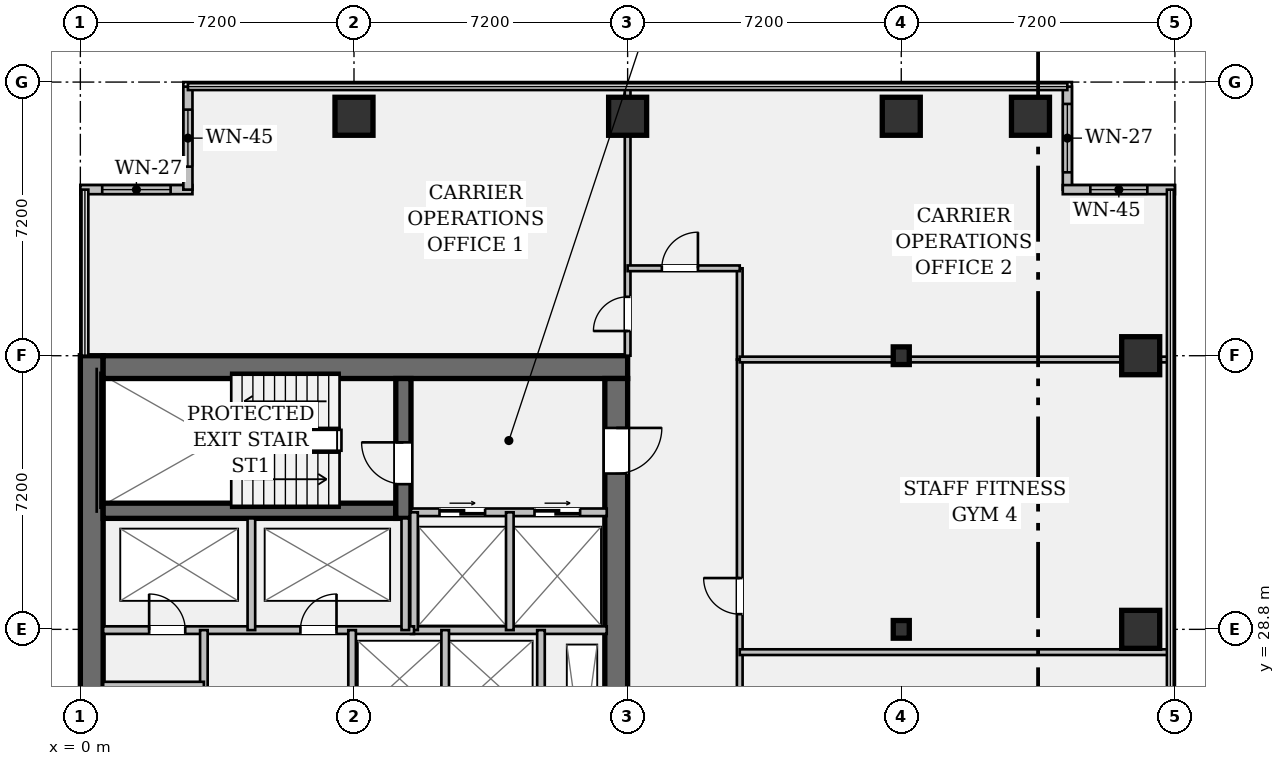
"""IFC4 building model, lengths in metres.
Left out: names, types, materials, properties, quantities, classifications, styles, units other than length and angle.
Written with IfcOpenShell. Run it as: python <this file> out.ifc"""

import sys

from ifc_helpers import new_model, si_unit, direction, frame, frame_2d, origin, origin_2d, place, context, subcontext, project, spatial, rectangle, hollow_rectangle, i_section, extrude, element, fill, save


model = new_model("IFC4")
c1 = context("Model", 3, precision=1e-05, world=origin(), true_north=direction((0.0, 1.0)))
c2 = subcontext(c1, "Body", "Model", "MODEL_VIEW")
j1 = project(units=[si_unit("LENGTHUNIT", "METRE"), si_unit("PLANEANGLEUNIT", "RADIAN")], contexts=[c1])
p1 = place(None, origin())
s1 = spatial("IfcSite", under=j1, at=p1, CompositionType="ELEMENT")
p2 = place(p1, origin())
s2 = spatial("IfcBuilding", under=s1, at=p2, CompositionType="ELEMENT")
p3 = place(p2, frame((0.0, 0.0, 65.8)))
s3 = spatial("IfcBuildingStorey", under=s2, at=p3, CompositionType="ELEMENT", Elevation=65.8)
p4 = place(p3, frame((0.3, 7.2, 0.0), z_axis=(0.0, 0.0, 1.0), x_axis=(0.0, 1.0, 0.0)))
e1 = element("IfcWall", 1, at=p4, inside=s3, PredefinedType="SHEAR", context=c2, shape_type="SweptSolid", body=[
    extrude(rectangle(XDim=28.8, YDim=0.6, at=frame_2d((14.4, 0.0))), origin(), (0.0, 0.0, 1.0), 3.57),
])
p5 = place(p3, frame((0.6, 35.7, 0.0), z_axis=(0.0, 0.0, 1.0), x_axis=(1.0, 0.0, 0.0)))
e2 = element("IfcWall", 2, at=p5, inside=s3, PredefinedType="SHEAR", context=c2, shape_type="SweptSolid", body=[
    extrude(rectangle(XDim=13.8, YDim=0.6, at=frame_2d((6.9, 0.0))), origin(), (0.0, 0.0, 1.0), 3.57),
])
p6 = place(p3, frame((14.1, 35.4, 0.0), z_axis=(0.0, 0.0, 1.0), x_axis=(0.0, -1.0, 0.0)))
e3 = element("IfcWall", 3, at=p6, inside=s3, PredefinedType="SHEAR", context=c2, shape_type="SweptSolid", body=[
    extrude(rectangle(XDim=27.6, YDim=0.6, at=frame_2d((13.8, 0.0))), origin(), (0.0, 0.0, 1.0), 3.57),
])
p7 = place(p6, frame((1.3, 0.0, 0.0)))
e4 = element("IfcOpeningElement", 4, at=p7, cuts=e3, PredefinedType="OPENING", context=c2, shape_type="SweptSolid", body=[
    extrude(rectangle(XDim=1.2, YDim=2.15, at=frame_2d((0.6, 1.075))), frame((0.0, 0.312, 0.0), z_axis=(0.0, -1.0, 0.0), x_axis=(1.0, 0.0, 0.0)), (0.0, 0.0, 1.0), 0.624),
])
p8 = place(p6, frame((25.25, 0.0, 0.0)))
e5 = element("IfcOpeningElement", 5, at=p8, cuts=e3, PredefinedType="OPENING", context=c2, shape_type="SweptSolid", body=[
    extrude(rectangle(XDim=1.2, YDim=2.15, at=frame_2d((0.6, 1.075))), frame((0.0, 0.312, 0.0), z_axis=(0.0, -1.0, 0.0), x_axis=(1.0, 0.0, 0.0)), (0.0, 0.0, 1.0), 0.624),
])
p9 = place(p6, frame((14.6, 0.0, 0.0)))
e6 = element("IfcOpeningElement", 6, at=p9, cuts=e3, PredefinedType="OPENING", context=c2, shape_type="SweptSolid", body=[
    extrude(rectangle(XDim=1.6, YDim=2.2, at=frame_2d((0.8, 1.1))), frame((0.0, 0.312, 0.0), z_axis=(0.0, -1.0, 0.0), x_axis=(1.0, 0.0, 0.0)), (0.0, 0.0, 1.0), 0.624),
])
p10 = place(p3, frame((0.6, 31.92, 0.0), z_axis=(0.0, 0.0, 1.0), x_axis=(1.0, 0.0, 0.0)))
e7 = element("IfcWall", 7, at=p10, inside=s3, PredefinedType="SHEAR", context=c2, shape_type="SweptSolid", body=[
    extrude(rectangle(XDim=7.7, YDim=0.4, at=frame_2d((3.85, 0.0))), origin(), (0.0, 0.0, 1.0), 3.57),
])
p11 = place(p3, frame((8.5, 31.72, 0.0), z_axis=(0.0, 0.0, 1.0), x_axis=(0.0, 1.0, 0.0)))
e8 = element("IfcWall", 8, at=p11, inside=s3, PredefinedType="SHEAR", context=c2, shape_type="SweptSolid", body=[
    extrude(rectangle(XDim=3.68, YDim=0.4, at=frame_2d((1.84, 0.0))), origin(), (0.0, 0.0, 1.0), 3.57),
])
p12 = place(p11, frame((0.9, 0.0, 0.0)))
e9 = element("IfcOpeningElement", 9, at=p12, cuts=e8, PredefinedType="OPENING", context=c2, shape_type="SweptSolid", body=[
    extrude(rectangle(XDim=1.1, YDim=2.15, at=frame_2d((0.55, 1.075))), frame((0.0, 0.212, 0.0), z_axis=(0.0, -1.0, 0.0), x_axis=(1.0, 0.0, 0.0)), (0.0, 0.0, 1.0), 0.424),
])
for number, where, z_axis, x_axis in (
    (10, (7.2, 42.3, 0.0), (0.0, 0.0, 1.0), (1.0, 0.0, 0.0)),
    (11, (14.4, 42.3, 0.0), (0.0, 0.0, 1.0), (1.0, 0.0, 0.0)),
):
    element("IfcColumn", number, at=place(p3, frame(where, z_axis=z_axis, x_axis=x_axis)), inside=s3, PredefinedType="COLUMN", context=c2, shape_type="SweptSolid", body=[
        extrude(hollow_rectangle(XDim=1.0, YDim=1.0, WallThickness=0.065, at=origin_2d()), origin(), (0.0, 0.0, 1.0), 3.57),
    ])
for number, where, z_axis, x_axis in (
    (12, (21.6, 28.8, 0.0), (0.0, 0.0, 1.0), (1.0, 0.0, 0.0)),
    (13, (21.6, 36.0, 0.0), (0.0, 0.0, 1.0), (1.0, 0.0, 0.0)),
):
    element("IfcColumn", number, at=place(p3, frame(where, z_axis=z_axis, x_axis=x_axis)), inside=s3, PredefinedType="COLUMN", context=c2, shape_type="SweptSolid", body=[
        extrude(i_section(OverallWidth=0.422, OverallDepth=0.465, WebThickness=0.045, FlangeThickness=0.073, FilletRadius=0.018, at=origin_2d()), origin(), (0.0, 0.0, 1.0), 3.57),
    ])
for number, where, z_axis, x_axis in (
    (14, (21.6, 42.3, 0.0), (0.0, 0.0, 1.0), (1.0, 0.0, 0.0)),
    (15, (25.0, 42.3, 0.0), (0.0, 0.0, 1.0), (1.0, 0.0, 0.0)),
    (16, (27.9, 28.8, 0.0), (0.0, 0.0, 1.0), (1.0, 0.0, 0.0)),
    (17, (27.9, 36.0, 0.0), (0.0, 0.0, 1.0), (1.0, 0.0, 0.0)),
):
    element("IfcColumn", number, at=place(p3, frame(where, z_axis=z_axis, x_axis=x_axis)), inside=s3, PredefinedType="COLUMN", context=c2, shape_type="SweptSolid", body=[
        extrude(hollow_rectangle(XDim=1.0, YDim=1.0, WallThickness=0.065, at=origin_2d()), origin(), (0.0, 0.0, 1.0), 3.57),
    ])
p13 = place(p3, frame((0.0, 40.37, 0.0), z_axis=(0.0, 0.0, 1.0), x_axis=(1.0, 0.0, 0.0)))
e18 = element("IfcWall", 18, at=p13, inside=s3, PredefinedType="STANDARD", context=c2, shape_type="SweptSolid", body=[
    extrude(rectangle(XDim=2.95, YDim=0.24, at=frame_2d((1.475, 0.0))), origin(), (0.0, 0.0, 1.0), 3.57),
])
p14 = place(p13, frame((0.575, 0.0, 0.95)))
e19 = element("IfcOpeningElement", 19, at=p14, cuts=e18, PredefinedType="OPENING", context=c2, shape_type="SweptSolid", body=[
    extrude(rectangle(XDim=1.8, YDim=1.35, at=frame_2d((0.9, 0.675))), frame((0.0, 0.132, 0.0), z_axis=(0.0, -1.0, 0.0), x_axis=(1.0, 0.0, 0.0)), (0.0, 0.0, 1.0), 0.264),
])
p15 = place(p3, frame((2.83, 40.37, 0.0), z_axis=(0.0, 0.0, 1.0), x_axis=(0.0, 1.0, 0.0)))
e20 = element("IfcWall", 20, at=p15, inside=s3, PredefinedType="STANDARD", context=c2, shape_type="SweptSolid", body=[
    extrude(rectangle(XDim=2.71, YDim=0.24, at=frame_2d((1.355, 0.0))), origin(), (0.0, 0.0, 1.0), 3.57),
])
p16 = place(p15, frame((0.605, 0.0, 0.95)))
e21 = element("IfcOpeningElement", 21, at=p16, cuts=e20, PredefinedType="OPENING", context=c2, shape_type="SweptSolid", body=[
    extrude(rectangle(XDim=1.5, YDim=1.8, at=frame_2d((0.75, 0.9))), frame((0.0, 0.132, 0.0), z_axis=(0.0, -1.0, 0.0), x_axis=(1.0, 0.0, 0.0)), (0.0, 0.0, 1.0), 0.264),
])
p17 = place(p3, frame((25.97, 43.08, 0.0), z_axis=(0.0, 0.0, 1.0), x_axis=(0.0, -1.0, 0.0)))
e22 = element("IfcWall", 22, at=p17, inside=s3, PredefinedType="STANDARD", context=c2, shape_type="SweptSolid", body=[
    extrude(rectangle(XDim=2.71, YDim=0.24, at=frame_2d((1.355, 0.0))), origin(), (0.0, 0.0, 1.0), 3.57),
])
p18 = place(p17, frame((0.455, 0.0, 0.95)))
e23 = element("IfcOpeningElement", 23, at=p18, cuts=e22, PredefinedType="OPENING", context=c2, shape_type="SweptSolid", body=[
    extrude(rectangle(XDim=1.8, YDim=1.35, at=frame_2d((0.9, 0.675))), frame((0.0, 0.132, 0.0), z_axis=(0.0, -1.0, 0.0), x_axis=(1.0, 0.0, 0.0)), (0.0, 0.0, 1.0), 0.264),
])
p19 = place(p3, frame((25.85, 40.37, 0.0), z_axis=(0.0, 0.0, 1.0), x_axis=(1.0, 0.0, 0.0)))
e24 = element("IfcWall", 24, at=p19, inside=s3, PredefinedType="STANDARD", context=c2, shape_type="SweptSolid", body=[
    extrude(rectangle(XDim=2.95, YDim=0.24, at=frame_2d((1.475, 0.0))), origin(), (0.0, 0.0, 1.0), 3.57),
])
p20 = place(p19, frame((0.725, 0.0, 0.95)))
e25 = element("IfcOpeningElement", 25, at=p20, cuts=e24, PredefinedType="OPENING", context=c2, shape_type="SweptSolid", body=[
    extrude(rectangle(XDim=1.5, YDim=1.8, at=frame_2d((0.75, 0.9))), frame((0.0, 0.132, 0.0), z_axis=(0.0, -1.0, 0.0), x_axis=(1.0, 0.0, 0.0)), (0.0, 0.0, 1.0), 0.264),
])
p21 = place(p3, frame((8.7, 31.88, 0.0), z_axis=(0.0, 0.0, 1.0), x_axis=(1.0, 0.0, 0.0)))
e26 = element("IfcWall", 26, at=p21, inside=s3, PredefinedType="PARTITIONING", context=c2, shape_type="SweptSolid", body=[
    extrude(rectangle(XDim=5.15, YDim=0.2, at=frame_2d((2.575, 0.0))), origin(), (0.0, 0.0, 1.0), 3.57),
])
p22 = place(p21, frame((0.75, 0.0, 0.0)))
e27 = element("IfcOpeningElement", 27, at=p22, cuts=e26, PredefinedType="OPENING", context=c2, shape_type="SweptSolid", body=[
    extrude(rectangle(XDim=1.2, YDim=2.2, at=frame_2d((0.6, 1.1))), frame((0.0, 0.112, 0.0), z_axis=(0.0, -1.0, 0.0), x_axis=(1.0, 0.0, 0.0)), (0.0, 0.0, 1.0), 0.224),
])
p23 = place(p21, frame((3.25, 0.0, 0.0)))
e28 = element("IfcOpeningElement", 28, at=p23, cuts=e26, PredefinedType="OPENING", context=c2, shape_type="SweptSolid", body=[
    extrude(rectangle(XDim=1.2, YDim=2.2, at=frame_2d((0.6, 1.1))), frame((0.0, 0.112, 0.0), z_axis=(0.0, -1.0, 0.0), x_axis=(1.0, 0.0, 0.0)), (0.0, 0.0, 1.0), 0.224),
])
p24 = place(p3, frame((8.7, 28.78, 0.0), z_axis=(0.0, 0.0, 1.0), x_axis=(1.0, 0.0, 0.0)))
e29 = element("IfcWall", 29, at=p24, inside=s3, PredefinedType="PARTITIONING", context=c2, shape_type="SweptSolid", body=[
    extrude(rectangle(XDim=5.15, YDim=0.2, at=frame_2d((2.575, 0.0))), origin(), (0.0, 0.0, 1.0), 3.57),
])
for number, where, z_axis, x_axis in (
    (30, (8.78, 28.78, 0.0), (0.0, 0.0, 1.0), (0.0, 1.0, 0.0)),
    (31, (11.3, 28.78, 0.0), (0.0, 0.0, 1.0), (0.0, 1.0, 0.0)),
):
    element("IfcWall", number, at=place(p3, frame(where, z_axis=z_axis, x_axis=x_axis)), inside=s3, PredefinedType="PARTITIONING", context=c2, shape_type="SweptSolid", body=[
        extrude(rectangle(XDim=3.1, YDim=0.2, at=frame_2d((1.55, 0.0))), origin(), (0.0, 0.0, 1.0), 3.57),
    ])
p25 = place(p3, frame((0.6, 28.78, 0.0), z_axis=(0.0, 0.0, 1.0), x_axis=(1.0, 0.0, 0.0)))
e32 = element("IfcWall", 32, at=p25, inside=s3, PredefinedType="PARTITIONING", context=c2, shape_type="SweptSolid", body=[
    extrude(rectangle(XDim=8.18, YDim=0.2, at=frame_2d((4.09, 0.0))), origin(), (0.0, 0.0, 1.0), 3.57),
])
p26 = place(p25, frame((1.21, 0.0, 0.0)))
e33 = element("IfcOpeningElement", 33, at=p26, cuts=e32, PredefinedType="OPENING", context=c2, shape_type="SweptSolid", body=[
    extrude(rectangle(XDim=0.95, YDim=2.15, at=frame_2d((0.475, 1.075))), frame((0.0, 0.112, 0.0), z_axis=(0.0, -1.0, 0.0), x_axis=(1.0, 0.0, 0.0)), (0.0, 0.0, 1.0), 0.224),
])
p27 = place(p25, frame((5.19, 0.0, 0.0)))
e34 = element("IfcOpeningElement", 34, at=p27, cuts=e32, PredefinedType="OPENING", context=c2, shape_type="SweptSolid", body=[
    extrude(rectangle(XDim=0.95, YDim=2.15, at=frame_2d((0.475, 1.075))), frame((0.0, 0.112, 0.0), z_axis=(0.0, -1.0, 0.0), x_axis=(1.0, 0.0, 0.0)), (0.0, 0.0, 1.0), 0.224),
])
for number, where, z_axis, x_axis in (
    (35, (4.5, 28.78, 0.0), (0.0, 0.0, 1.0), (0.0, 1.0, 0.0)),
    (36, (8.55, 28.78, 0.0), (0.0, 0.0, 1.0), (0.0, 1.0, 0.0)),
):
    element("IfcWall", number, at=place(p3, frame(where, z_axis=z_axis, x_axis=x_axis)), inside=s3, PredefinedType="PARTITIONING", context=c2, shape_type="SweptSolid", body=[
        extrude(rectangle(XDim=2.94, YDim=0.2, at=frame_2d((1.47, 0.0))), origin(), (0.0, 0.0, 1.0), 3.57),
    ])
p28 = place(p3, frame((3.25, 15.7, 0.0), z_axis=(0.0, 0.0, 1.0), x_axis=(0.0, 1.0, 0.0)))
e37 = element("IfcWall", 37, at=p28, inside=s3, PredefinedType="PARTITIONING", context=c2, shape_type="SweptSolid", body=[
    extrude(rectangle(XDim=13.08, YDim=0.2, at=frame_2d((6.54, 0.0))), origin(), (0.0, 0.0, 1.0), 3.57),
])
p29 = place(p3, frame((0.6, 27.32, 0.0), z_axis=(0.0, 0.0, 1.0), x_axis=(1.0, 0.0, 0.0)))
e38 = element("IfcWall", 38, at=p29, inside=s3, PredefinedType="PARTITIONING", context=c2, shape_type="SweptSolid", body=[
    extrude(rectangle(XDim=2.65, YDim=0.2, at=frame_2d((1.325, 0.0))), origin(), (0.0, 0.0, 1.0), 3.57),
])
for number, where, z_axis, x_axis in (
    (39, (7.15, 26.4, 0.0), (0.0, 0.0, 1.0), (0.0, 1.0, 0.0)),
    (40, (9.6, 26.4, 0.0), (0.0, 0.0, 1.0), (0.0, 1.0, 0.0)),
):
    element("IfcWall", number, at=place(p3, frame(where, z_axis=z_axis, x_axis=x_axis)), inside=s3, PredefinedType="PARTITIONING", context=c2, shape_type="SweptSolid", body=[
        extrude(rectangle(XDim=2.38, YDim=0.2, at=frame_2d((1.19, 0.0))), origin(), (0.0, 0.0, 1.0), 3.57),
    ])
p30 = place(p3, frame((12.12, 22.2, 0.0), z_axis=(0.0, 0.0, 1.0), x_axis=(0.0, 1.0, 0.0)))
e41 = element("IfcWall", 41, at=p30, inside=s3, PredefinedType="PARTITIONING", context=c2, shape_type="SweptSolid", body=[
    extrude(rectangle(XDim=6.58, YDim=0.2, at=frame_2d((3.29, 0.0))), origin(), (0.0, 0.0, 1.0), 3.57),
])
p31 = place(p30, frame((2.75, 0.0, 0.0)))
e42 = element("IfcOpeningElement", 42, at=p31, cuts=e41, PredefinedType="OPENING", context=c2, shape_type="SweptSolid", body=[
    extrude(rectangle(XDim=0.85, YDim=2.15, at=frame_2d((0.425, 1.075))), frame((0.0, 0.112, 0.0), z_axis=(0.0, -1.0, 0.0), x_axis=(1.0, 0.0, 0.0)), (0.0, 0.0, 1.0), 0.224),
])
p32 = place(p3, frame((17.35, 13.6, 0.0), z_axis=(0.0, 0.0, 1.0), x_axis=(0.0, 1.0, 0.0)))
e43 = element("IfcWall", 43, at=p32, inside=s3, PredefinedType="PARTITIONING", context=c2, shape_type="SweptSolid", body=[
    extrude(rectangle(XDim=22.3, YDim=0.15, at=frame_2d((11.15, 0.0))), origin(), (0.0, 0.0, 1.0), 2.699),
])
p33 = place(p32, frame((4.3, 0.0, 0.0)))
e44 = element("IfcOpeningElement", 44, at=p33, cuts=e43, PredefinedType="OPENING", context=c2, shape_type="SweptSolid", body=[
    extrude(rectangle(XDim=0.95, YDim=2.15, at=frame_2d((0.475, 1.075))), frame((0.0, 0.087, 0.0), z_axis=(0.0, -1.0, 0.0), x_axis=(1.0, 0.0, 0.0)), (0.0, 0.0, 1.0), 0.174),
])
p34 = place(p32, frame((8.0, 0.0, 0.0)))
e45 = element("IfcOpeningElement", 45, at=p34, cuts=e43, PredefinedType="OPENING", context=c2, shape_type="SweptSolid", body=[
    extrude(rectangle(XDim=0.95, YDim=2.15, at=frame_2d((0.475, 1.075))), frame((0.0, 0.087, 0.0), z_axis=(0.0, -1.0, 0.0), x_axis=(1.0, 0.0, 0.0)), (0.0, 0.0, 1.0), 0.174),
])
p35 = place(p32, frame((15.6, 0.0, 0.0)))
e46 = element("IfcOpeningElement", 46, at=p35, cuts=e43, PredefinedType="OPENING", context=c2, shape_type="SweptSolid", body=[
    extrude(rectangle(XDim=0.95, YDim=2.15, at=frame_2d((0.475, 1.075))), frame((0.0, 0.087, 0.0), z_axis=(0.0, -1.0, 0.0), x_axis=(1.0, 0.0, 0.0)), (0.0, 0.0, 1.0), 0.174),
])
p36 = place(p3, frame((14.4, 36.0, 0.0), z_axis=(0.0, 0.0, 1.0), x_axis=(0.0, 1.0, 0.0)))
e47 = element("IfcWall", 47, at=p36, inside=s3, PredefinedType="PARTITIONING", context=c2, shape_type="SweptSolid", body=[
    extrude(rectangle(XDim=7.08, YDim=0.15, at=frame_2d((3.54, 0.0))), origin(), (0.0, 0.0, 1.0), 2.699),
])
p37 = place(p36, frame((0.65, 0.0, 0.0)))
e48 = element("IfcOpeningElement", 48, at=p37, cuts=e47, PredefinedType="OPENING", context=c2, shape_type="SweptSolid", body=[
    extrude(rectangle(XDim=0.9, YDim=2.15, at=frame_2d((0.45, 1.075))), frame((0.0, 0.087, 0.0), z_axis=(0.0, -1.0, 0.0), x_axis=(1.0, 0.0, 0.0)), (0.0, 0.0, 1.0), 0.174),
])
p38 = place(p3, frame((17.35, 35.9, 0.0), z_axis=(0.0, 0.0, 1.0), x_axis=(0.0, 1.0, 0.0)))
e49 = element("IfcWall", 49, at=p38, inside=s3, PredefinedType="PARTITIONING", context=c2, shape_type="SweptSolid", body=[
    extrude(rectangle(XDim=2.4, YDim=0.15, at=frame_2d((1.2, 0.0))), origin(), (0.0, 0.0, 1.0), 2.699),
])
p39 = place(p3, frame((14.4, 38.3, 0.0), z_axis=(0.0, 0.0, 1.0), x_axis=(1.0, 0.0, 0.0)))
e50 = element("IfcWall", 50, at=p39, inside=s3, PredefinedType="PARTITIONING", context=c2, shape_type="SweptSolid", body=[
    extrude(rectangle(XDim=2.95, YDim=0.15, at=frame_2d((1.475, 0.0))), origin(), (0.0, 0.0, 1.0), 2.699),
])
p40 = place(p39, frame((0.9, 0.0, 0.0)))
e51 = element("IfcOpeningElement", 51, at=p40, cuts=e50, PredefinedType="OPENING", context=c2, shape_type="SweptSolid", body=[
    extrude(rectangle(XDim=0.95, YDim=2.15, at=frame_2d((0.475, 1.075))), frame((0.0, 0.087, 0.0), z_axis=(0.0, -1.0, 0.0), x_axis=(1.0, 0.0, 0.0)), (0.0, 0.0, 1.0), 0.174),
])
for number, where, z_axis, x_axis in (
    (52, (17.35, 35.9, 0.0), (0.0, 0.0, 1.0), (1.0, 0.0, 0.0)),
    (53, (17.35, 28.2, 0.0), (0.0, 0.0, 1.0), (1.0, 0.0, 0.0)),
):
    element("IfcWall", number, at=place(p3, frame(where, z_axis=z_axis, x_axis=x_axis)), inside=s3, PredefinedType="PARTITIONING", context=c2, shape_type="SweptSolid", body=[
        extrude(rectangle(XDim=11.33, YDim=0.15, at=frame_2d((5.665, 0.0))), origin(), (0.0, 0.0, 1.0), 2.699),
    ])
p41 = place(p14, origin())
e54 = element("IfcWindow", 54, at=p41, inside=s3, PartitioningType="SINGLE_PANEL", PredefinedType="WINDOW", context=c2, shape_type="SweptSolid", body=[
    extrude(rectangle(XDim=1.8, YDim=1.35, at=frame_2d((0.9, 0.675))), frame((0.0, 0.03, 0.0), z_axis=(0.0, -1.0, 0.0), x_axis=(1.0, 0.0, 0.0)), (0.0, 0.0, 1.0), 0.06),
])
fill(e19, e54)
p42 = place(p16, origin())
e55 = element("IfcWindow", 55, at=p42, inside=s3, PartitioningType="SINGLE_PANEL", PredefinedType="WINDOW", context=c2, shape_type="SweptSolid", body=[
    extrude(rectangle(XDim=1.5, YDim=1.8, at=frame_2d((0.75, 0.9))), frame((0.0, 0.03, 0.0), z_axis=(0.0, -1.0, 0.0), x_axis=(1.0, 0.0, 0.0)), (0.0, 0.0, 1.0), 0.06),
])
fill(e21, e55)
p43 = place(p18, origin())
e56 = element("IfcWindow", 56, at=p43, inside=s3, PartitioningType="SINGLE_PANEL", PredefinedType="WINDOW", context=c2, shape_type="SweptSolid", body=[
    extrude(rectangle(XDim=1.8, YDim=1.35, at=frame_2d((0.9, 0.675))), frame((0.0, 0.03, 0.0), z_axis=(0.0, -1.0, 0.0), x_axis=(1.0, 0.0, 0.0)), (0.0, 0.0, 1.0), 0.06),
])
fill(e23, e56)
p44 = place(p20, origin())
e57 = element("IfcWindow", 57, at=p44, inside=s3, PartitioningType="SINGLE_PANEL", PredefinedType="WINDOW", context=c2, shape_type="SweptSolid", body=[
    extrude(rectangle(XDim=1.5, YDim=1.8, at=frame_2d((0.75, 0.9))), frame((0.0, 0.03, 0.0), z_axis=(0.0, -1.0, 0.0), x_axis=(1.0, 0.0, 0.0)), (0.0, 0.0, 1.0), 0.06),
])
fill(e25, e57)
p45 = place(p12, origin())
e58 = element("IfcDoor", 58, at=p45, inside=s3, OperationType="SINGLE_SWING_RIGHT", PredefinedType="DOOR", context=c2, shape_type="SweptSolid", body=[
    extrude(rectangle(XDim=1.1, YDim=2.15, at=frame_2d((0.55, 1.075))), frame((0.0, 0.025, 0.0), z_axis=(0.0, -1.0, 0.0), x_axis=(1.0, 0.0, 0.0)), (0.0, 0.0, 1.0), 0.05),
])
fill(e9, e58)
p46 = place(p7, origin())
e59 = element("IfcDoor", 59, at=p46, inside=s3, OperationType="SINGLE_SWING_LEFT", PredefinedType="DOOR", context=c2, shape_type="SweptSolid", body=[
    extrude(rectangle(XDim=1.2, YDim=2.15, at=frame_2d((0.6, 1.075))), frame((0.0, 0.025, 0.0), z_axis=(0.0, -1.0, 0.0), x_axis=(1.0, 0.0, 0.0)), (0.0, 0.0, 1.0), 0.05),
])
fill(e4, e59)
p47 = place(p22, origin())
e60 = element("IfcDoor", 60, at=p47, inside=s3, OperationType="DOUBLE_DOOR_SLIDING", PredefinedType="DOOR", context=c2, shape_type="SweptSolid", body=[
    extrude(rectangle(XDim=1.2, YDim=2.2, at=frame_2d((0.6, 1.1))), frame((0.0, 0.025, 0.0), z_axis=(0.0, -1.0, 0.0), x_axis=(1.0, 0.0, 0.0)), (0.0, 0.0, 1.0), 0.05),
])
fill(e27, e60)
p48 = place(p23, origin())
e61 = element("IfcDoor", 61, at=p48, inside=s3, OperationType="DOUBLE_DOOR_SLIDING", PredefinedType="DOOR", context=c2, shape_type="SweptSolid", body=[
    extrude(rectangle(XDim=1.2, YDim=2.2, at=frame_2d((0.6, 1.1))), frame((0.0, 0.025, 0.0), z_axis=(0.0, -1.0, 0.0), x_axis=(1.0, 0.0, 0.0)), (0.0, 0.0, 1.0), 0.05),
])
fill(e28, e61)
p49 = place(p26, origin())
e62 = element("IfcDoor", 62, at=p49, inside=s3, OperationType="SINGLE_SWING_LEFT", PredefinedType="DOOR", context=c2, shape_type="SweptSolid", body=[
    extrude(rectangle(XDim=0.95, YDim=2.15, at=frame_2d((0.475, 1.075))), frame((0.0, 0.025, 0.0), z_axis=(0.0, -1.0, 0.0), x_axis=(1.0, 0.0, 0.0)), (0.0, 0.0, 1.0), 0.05),
])
fill(e33, e62)
p50 = place(p27, origin())
e63 = element("IfcDoor", 63, at=p50, inside=s3, OperationType="SINGLE_SWING_RIGHT", PredefinedType="DOOR", context=c2, shape_type="SweptSolid", body=[
    extrude(rectangle(XDim=0.95, YDim=2.15, at=frame_2d((0.475, 1.075))), frame((0.0, 0.025, 0.0), z_axis=(0.0, -1.0, 0.0), x_axis=(1.0, 0.0, 0.0)), (0.0, 0.0, 1.0), 0.05),
])
fill(e34, e63)
p51 = place(p37, origin())
e64 = element("IfcDoor", 64, at=p51, inside=s3, OperationType="SINGLE_SWING_LEFT", PredefinedType="DOOR", context=c2, shape_type="SweptSolid", body=[
    extrude(rectangle(XDim=0.9, YDim=2.15, at=frame_2d((0.45, 1.075))), frame((0.0, 0.025, 0.0), z_axis=(0.0, -1.0, 0.0), x_axis=(1.0, 0.0, 0.0)), (0.0, 0.0, 1.0), 0.05),
])
fill(e48, e64)
p52 = place(p40, origin())
e65 = element("IfcDoor", 65, at=p52, inside=s3, OperationType="SINGLE_SWING_RIGHT", PredefinedType="DOOR", context=c2, shape_type="SweptSolid", body=[
    extrude(rectangle(XDim=0.95, YDim=2.15, at=frame_2d((0.475, 1.075))), frame((0.0, 0.025, 0.0), z_axis=(0.0, -1.0, 0.0), x_axis=(1.0, 0.0, 0.0)), (0.0, 0.0, 1.0), 0.05),
])
fill(e51, e65)
p53 = place(p35, origin())
e66 = element("IfcDoor", 66, at=p53, inside=s3, OperationType="SINGLE_SWING_RIGHT", PredefinedType="DOOR", context=c2, shape_type="SweptSolid", body=[
    extrude(rectangle(XDim=0.95, YDim=2.15, at=frame_2d((0.475, 1.075))), frame((0.0, 0.025, 0.0), z_axis=(0.0, -1.0, 0.0), x_axis=(1.0, 0.0, 0.0)), (0.0, 0.0, 1.0), 0.05),
])
fill(e46, e66)
save(model, sys.argv[1])
